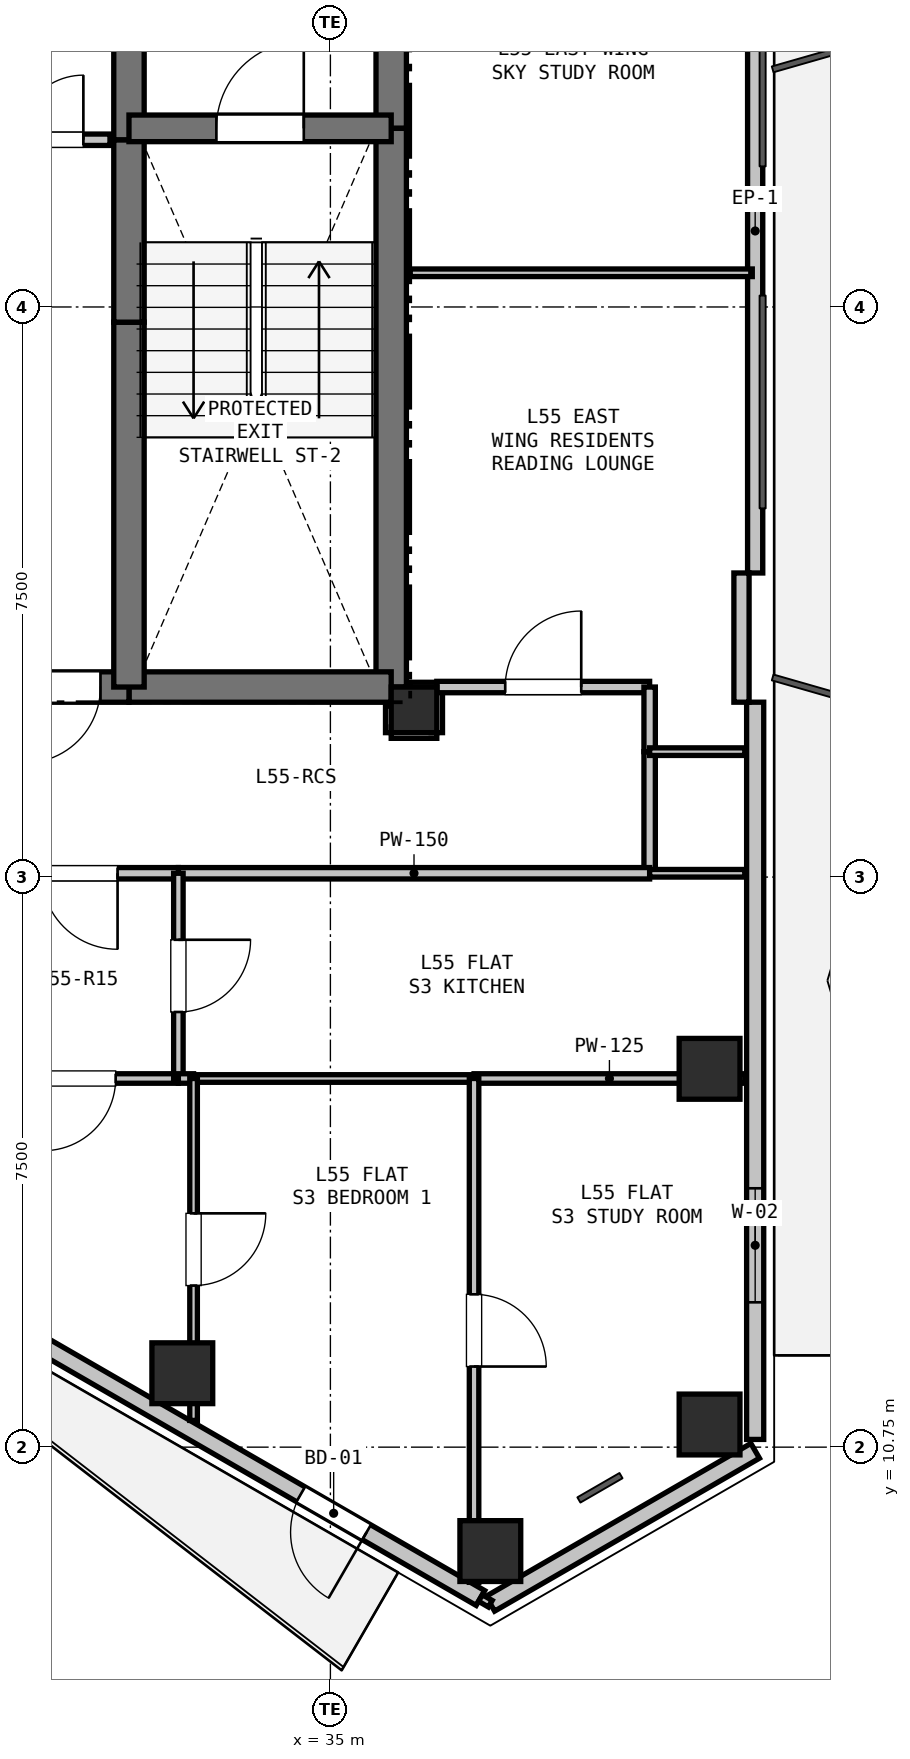
"""IFC4 building model, lengths in metres.
Left out: names, types, materials, properties, quantities, classifications, styles, units other than length and angle.
Written with IfcOpenShell. Run it as: python <this file> out.ifc"""

import sys

from ifc_helpers import new_model, si_unit, direction, frame, frame_2d, origin, origin_2d, place, context, subcontext, project, spatial, rectangle, hollow_rectangle, extrude, element, fill, save


model = new_model("IFC4")
c1 = context("Model", 3, precision=1e-05, world=origin(), true_north=direction((0.0, 1.0)))
c2 = subcontext(c1, "Body", "Model", "MODEL_VIEW")
j1 = project(units=[si_unit("LENGTHUNIT", "METRE"), si_unit("PLANEANGLEUNIT", "RADIAN")], contexts=[c1])
p1 = place(None, origin())
s1 = spatial("IfcSite", under=j1, at=p1, CompositionType="ELEMENT")
p2 = place(p1, origin())
s2 = spatial("IfcBuilding", under=s1, at=p2, CompositionType="ELEMENT")
p3 = place(p2, frame((0.0, 0.0, 198.6)))
s3 = spatial("IfcBuildingStorey", under=s2, at=p3, CompositionType="ELEMENT", Elevation=198.6)
p4 = place(p3, frame((36.1, 20.45, 0.0), z_axis=(0.0, 0.0, 1.0), x_axis=(1.0, 0.0, 0.0)))
e1 = element("IfcColumn", 1, at=p4, inside=s3, PredefinedType="COLUMN", context=c2, shape_type="SweptSolid", body=[
    extrude(rectangle(XDim=0.6, YDim=0.6, at=origin_2d()), origin(), (0.0, 0.0, 1.0), 3.3),
])
for number, where, z_axis, x_axis in (
    (2, (39.988, 15.727, 0.0), (0.0, 0.0, 1.0), (1.0, 0.0, 0.0)),
    (3, (39.988, 11.048, 0.0), (0.0, 0.0, 1.0), (1.0, 0.0, 0.0)),
    (4, (37.104, 9.383, 0.0), (0.0, 0.0, 1.0), (1.0, 0.0, 0.0)),
    (5, (33.052, 11.722, 0.0), (0.0, 0.0, 1.0), (1.0, 0.0, 0.0)),
):
    element("IfcColumn", number, at=place(p3, frame(where, z_axis=z_axis, x_axis=x_axis)), inside=s3, PredefinedType="COLUMN", context=c2, shape_type="SweptSolid", body=[
        extrude(hollow_rectangle(XDim=0.8, YDim=0.8, WallThickness=0.025, at=origin_2d()), origin(), (0.0, 0.0, 1.0), 3.3),
    ])
p5 = place(p3, frame((40.588, 10.702, 0.0), z_axis=(0.0, 0.0, 1.0), x_axis=(-0.866023907196, -0.500002592159, 0.0)))
e6 = element("IfcWall", 6, at=p5, inside=s3, PredefinedType="SOLIDWALL", context=c2, shape_type="SweptSolid", body=[
    extrude(rectangle(XDim=4.023, YDim=0.225, at=frame_2d((2.012, 0.0))), origin(), (0.0, 0.0, 1.0), 2.69),
])
p6 = place(p3, frame((40.588, 31.25, 0.0), z_axis=(0.0, 0.0, 1.0), x_axis=(0.0, -1.0, 0.0)))
e7 = element("IfcWall", 7, at=p6, inside=s3, PredefinedType="PARAPET", context=c2, shape_type="SweptSolid", body=[
    extrude(rectangle(XDim=8.999, YDim=0.2, at=frame_2d((4.5, 0.0))), origin(), (0.0, 0.0, 1.0), 0.2),
])
p7 = place(p3, frame((40.588, 20.551, 0.0), z_axis=(0.0, 0.0, 1.0), x_axis=(0.0, -1.0, 0.0)))
e8 = element("IfcWall", 8, at=p7, inside=s3, PredefinedType="SOLIDWALL", context=c2, shape_type="SweptSolid", body=[
    extrude(rectangle(XDim=9.699, YDim=0.225, at=frame_2d((4.85, 0.0))), origin(), (0.0, 0.0, 1.0), 2.69),
])
p8 = place(p7, frame((6.395, 0.0, 0.9)))
e9 = element("IfcOpeningElement", 9, at=p8, cuts=e8, PredefinedType="OPENING", context=c2, shape_type="SweptSolid", body=[
    extrude(rectangle(XDim=1.5, YDim=1.5, at=frame_2d((0.75, 0.75))), frame((0.0, 0.123, 0.0), z_axis=(0.0, -1.0, 0.0), x_axis=(1.0, 0.0, 0.0)), (0.0, 0.0, 1.0), 0.245),
])
p9 = place(p3, frame((40.408, 22.25, 0.0), z_axis=(0.0, 0.0, 1.0), x_axis=(0.0, -1.0, 0.0)))
e10 = element("IfcWall", 10, at=p9, inside=s3, PredefinedType="PARAPET", context=c2, shape_type="SweptSolid", body=[
    extrude(rectangle(XDim=1.7, YDim=0.2, at=frame_2d((0.85, 0.0))), origin(), (0.0, 0.0, 1.0), 2.69),
])
p10 = place(p3, frame((36.974, 8.765, 0.0), z_axis=(0.0, 0.0, 1.0), x_axis=(-0.866016233231, 0.500015883528, 0.0)))
e11 = element("IfcWall", 11, at=p10, inside=s3, PredefinedType="SOLIDWALL", context=c2, shape_type="SweptSolid", body=[
    extrude(rectangle(XDim=9.699, YDim=0.225, at=frame_2d((4.85, 0.0))), origin(), (0.0, 0.0, 1.0), 2.69),
])
p11 = place(p10, frame((1.73, 0.0, 0.0)))
e12 = element("IfcOpeningElement", 12, at=p11, cuts=e11, PredefinedType="OPENING", context=c2, shape_type="SweptSolid", body=[
    extrude(rectangle(XDim=1.0, YDim=2.1, at=frame_2d((0.5, 1.05))), frame((0.0, 0.123, 0.0), z_axis=(0.0, -1.0, 0.0), x_axis=(1.0, 0.0, 0.0)), (0.0, 0.0, 1.0), 0.245),
])
p12 = place(p3, frame((35.8, 32.75, 0.0), z_axis=(0.0, 0.0, 1.0), x_axis=(0.0, -1.0, 0.0)))
e13 = element("IfcWall", 13, at=p12, inside=s3, PredefinedType="SHEAR", context=c2, shape_type="SweptSolid", body=[
    extrude(rectangle(XDim=4.65, YDim=0.4, at=frame_2d((2.325, 0.0))), origin(), (0.0, 0.0, 1.0), 3.07),
])
p13 = place(p3, frame((35.8, 28.1, 0.0), z_axis=(0.0, 0.0, 1.0), x_axis=(0.0, -1.0, 0.0)))
e14 = element("IfcWall", 14, at=p13, inside=s3, PredefinedType="SHEAR", context=c2, shape_type="SweptSolid", body=[
    extrude(rectangle(XDim=7.35, YDim=0.4, at=frame_2d((3.675, 0.0))), origin(), (0.0, 0.0, 1.0), 3.07),
])
p14 = place(p3, frame((35.8, 20.75, 0.0), z_axis=(0.0, 0.0, 1.0), x_axis=(-1.0, 0.0, 0.0)))
e15 = element("IfcWall", 15, at=p14, inside=s3, PredefinedType="SHEAR", context=c2, shape_type="SweptSolid", body=[
    extrude(rectangle(XDim=3.45, YDim=0.4, at=frame_2d((1.725, 0.0))), origin(), (0.0, 0.0, 1.0), 3.07),
])
p15 = place(p3, frame((32.35, 20.75, 0.0), z_axis=(0.0, 0.0, 1.0), x_axis=(-1.0, 0.0, 0.0)))
e16 = element("IfcWall", 16, at=p15, inside=s3, PredefinedType="SHEAR", context=c2, shape_type="SweptSolid", body=[
    extrude(rectangle(XDim=1.75, YDim=0.4, at=frame_2d((0.875, 0.0))), origin(), (0.0, 0.0, 1.0), 3.07),
])
p16 = place(p15, frame((0.375, 0.0, 0.0)))
e17 = element("IfcOpeningElement", 17, at=p16, cuts=e16, PredefinedType="OPENING", context=c2, shape_type="SweptSolid", body=[
    extrude(rectangle(XDim=1.0, YDim=2.15, at=frame_2d((0.5, 1.075))), frame((0.0, 0.21, 0.0), z_axis=(0.0, -1.0, 0.0), x_axis=(1.0, 0.0, 0.0)), (0.0, 0.0, 1.0), 0.42),
])
p17 = place(p3, frame((32.35, 20.75, 0.0), z_axis=(0.0, 0.0, 1.0), x_axis=(0.0, 1.0, 0.0)))
e18 = element("IfcWall", 18, at=p17, inside=s3, PredefinedType="SHEAR", context=c2, shape_type="SweptSolid", body=[
    extrude(rectangle(XDim=4.8, YDim=0.4, at=frame_2d((2.4, 0.0))), origin(), (0.0, 0.0, 1.0), 3.07),
])
p18 = place(p3, frame((32.35, 25.55, 0.0), z_axis=(0.0, 0.0, 1.0), x_axis=(0.0, 1.0, 0.0)))
e19 = element("IfcWall", 19, at=p18, inside=s3, PredefinedType="SHEAR", context=c2, shape_type="SweptSolid", body=[
    extrude(rectangle(XDim=2.4, YDim=0.4, at=frame_2d((1.2, 0.0))), origin(), (0.0, 0.0, 1.0), 3.07),
])
p19 = place(p3, frame((32.35, 27.95, 0.0), z_axis=(0.0, 0.0, 1.0), x_axis=(0.0, 1.0, 0.0)))
e20 = element("IfcWall", 20, at=p19, inside=s3, PredefinedType="SHEAR", context=c2, shape_type="SweptSolid", body=[
    extrude(rectangle(XDim=2.8, YDim=0.4, at=frame_2d((1.4, 0.0))), origin(), (0.0, 0.0, 1.0), 3.07),
])
p20 = place(p3, frame((32.35, 28.1, 0.0), z_axis=(0.0, 0.0, 1.0), x_axis=(1.0, 0.0, 0.0)))
e21 = element("IfcWall", 21, at=p20, inside=s3, PredefinedType="SHEAR", context=c2, shape_type="SweptSolid", body=[
    extrude(rectangle(XDim=3.45, YDim=0.35, at=frame_2d((1.725, 0.0))), origin(), (0.0, 0.0, 1.0), 3.07),
])
p21 = place(p20, frame((1.15, 0.0, 0.0)))
e22 = element("IfcOpeningElement", 22, at=p21, cuts=e21, PredefinedType="OPENING", context=c2, shape_type="SweptSolid", body=[
    extrude(rectangle(XDim=1.15, YDim=2.15, at=frame_2d((0.575, 1.075))), frame((0.0, 0.185, 0.0), z_axis=(0.0, -1.0, 0.0), x_axis=(1.0, 0.0, 0.0)), (0.0, 0.0, 1.0), 0.37),
])
p22 = place(p3, frame((30.55, 27.95, 0.0), z_axis=(0.0, 0.0, 1.0), x_axis=(1.0, 0.0, 0.0)))
e23 = element("IfcWall", 23, at=p22, inside=s3, PredefinedType="PARTITIONING", context=c2, shape_type="SweptSolid", body=[
    extrude(rectangle(XDim=1.55, YDim=0.15, at=frame_2d((0.775, 0.0))), origin(), (0.0, 0.0, 1.0), 3.07),
])
p23 = place(p22, frame((0.35, 0.0, 0.0)))
e24 = element("IfcOpeningElement", 24, at=p23, cuts=e23, PredefinedType="OPENING", context=c2, shape_type="SweptSolid", body=[
    extrude(rectangle(XDim=0.85, YDim=2.1, at=frame_2d((0.425, 1.05))), frame((0.0, 0.085, 0.0), z_axis=(0.0, -1.0, 0.0), x_axis=(1.0, 0.0, 0.0)), (0.0, 0.0, 1.0), 0.17),
])
p24 = place(p3, frame((35.8, 20.5, 0.0), z_axis=(0.0, 0.0, 1.0), x_axis=(0.0, -1.0, 0.0)))
e25 = element("IfcWall", 25, at=p24, inside=s3, PredefinedType="PARTITIONING", context=c2, shape_type="SweptSolid", body=[
    extrude(rectangle(XDim=0.35, YDim=0.15, at=frame_2d((0.175, 0.0))), origin(), (0.0, 0.0, 1.0), 2.595),
])
p25 = place(p3, frame((35.8, 20.15, 0.0), z_axis=(0.0, 0.0, 1.0), x_axis=(1.0, 0.0, 0.0)))
e26 = element("IfcWall", 26, at=p25, inside=s3, PredefinedType="PARTITIONING", context=c2, shape_type="SweptSolid", body=[
    extrude(rectangle(XDim=0.6, YDim=0.15, at=frame_2d((0.3, 0.0))), origin(), (0.0, 0.0, 1.0), 2.518),
])
p26 = place(p3, frame((36.4, 20.15, 0.0), z_axis=(0.0, 0.0, 1.0), x_axis=(0.0, 1.0, 0.0)))
e27 = element("IfcWall", 27, at=p26, inside=s3, PredefinedType="PARTITIONING", context=c2, shape_type="SweptSolid", body=[
    extrude(rectangle(XDim=0.6, YDim=0.15, at=frame_2d((0.3, 0.0))), origin(), (0.0, 0.0, 1.0), 2.518),
])
p27 = place(p3, frame((36.4, 20.75, 0.0), z_axis=(0.0, 0.0, 1.0), x_axis=(1.0, 0.0, 0.0)))
e28 = element("IfcWall", 28, at=p27, inside=s3, PredefinedType="PARTITIONING", context=c2, shape_type="SweptSolid", body=[
    extrude(rectangle(XDim=2.8, YDim=0.15, at=frame_2d((1.4, 0.0))), origin(), (0.0, 0.0, 1.0), 3.07),
])
p28 = place(p27, frame((0.9, 0.0, 0.0)))
e29 = element("IfcOpeningElement", 29, at=p28, cuts=e28, PredefinedType="OPENING", context=c2, shape_type="SweptSolid", body=[
    extrude(rectangle(XDim=1.0, YDim=2.15, at=frame_2d((0.5, 1.075))), frame((0.0, 0.085, 0.0), z_axis=(0.0, -1.0, 0.0), x_axis=(1.0, 0.0, 0.0)), (0.0, 0.0, 1.0), 0.17),
])
p29 = place(p3, frame((39.2, 20.75, 0.0), z_axis=(0.0, 0.0, 1.0), x_axis=(0.0, -1.0, 0.0)))
e30 = element("IfcWall", 30, at=p29, inside=s3, PredefinedType="PARTITIONING", context=c2, shape_type="SweptSolid", body=[
    extrude(rectangle(XDim=0.85, YDim=0.15, at=frame_2d((0.425, 0.0))), origin(), (0.0, 0.0, 1.0), 3.07),
])
p30 = place(p3, frame((39.2, 19.9, 0.0), z_axis=(0.0, 0.0, 1.0), x_axis=(0.0, -1.0, 0.0)))
e31 = element("IfcWall", 31, at=p30, inside=s3, PredefinedType="PARTITIONING", context=c2, shape_type="SweptSolid", body=[
    extrude(rectangle(XDim=1.6, YDim=0.15, at=frame_2d((0.8, 0.0))), origin(), (0.0, 0.0, 1.0), 3.07),
])
p31 = place(p3, frame((39.2, 18.3, 0.0), z_axis=(0.0, 0.0, 1.0), x_axis=(-1.0, 0.0, 0.0)))
e32 = element("IfcWall", 32, at=p31, inside=s3, PredefinedType="PARTITIONING", context=c2, shape_type="SweptSolid", body=[
    extrude(rectangle(XDim=6.2, YDim=0.15, at=frame_2d((3.1, 0.0))), origin(), (0.0, 0.0, 1.0), 2.518),
])
p32 = place(p3, frame((33.0, 18.3, 0.0), z_axis=(0.0, 0.0, 1.0), x_axis=(-1.0, 0.0, 0.0)))
e33 = element("IfcWall", 33, at=p32, inside=s3, PredefinedType="PARTITIONING", context=c2, shape_type="SweptSolid", body=[
    extrude(rectangle(XDim=2.6, YDim=0.15, at=frame_2d((1.3, 0.0))), origin(), (0.0, 0.0, 1.0), 3.07),
])
p33 = place(p32, frame((0.8, 0.0, 0.0)))
e34 = element("IfcOpeningElement", 34, at=p33, cuts=e33, PredefinedType="OPENING", context=c2, shape_type="SweptSolid", body=[
    extrude(rectangle(XDim=1.0, YDim=2.15, at=frame_2d((0.5, 1.075))), frame((0.0, 0.085, 0.0), z_axis=(0.0, -1.0, 0.0), x_axis=(1.0, 0.0, 0.0)), (0.0, 0.0, 1.0), 0.17),
])
p34 = place(p3, frame((33.0, 15.6, 0.0), z_axis=(0.0, 0.0, 1.0), x_axis=(-1.0, 0.0, 0.0)))
e35 = element("IfcWall", 35, at=p34, inside=s3, PredefinedType="PARTITIONING", context=c2, shape_type="SweptSolid", body=[
    extrude(rectangle(XDim=2.6, YDim=0.125, at=frame_2d((1.3, 0.0))), origin(), (0.0, 0.0, 1.0), 3.07),
])
p35 = place(p34, frame((0.825, 0.0, 0.0)))
e36 = element("IfcOpeningElement", 36, at=p35, cuts=e35, PredefinedType="OPENING", context=c2, shape_type="SweptSolid", body=[
    extrude(rectangle(XDim=0.95, YDim=2.1, at=frame_2d((0.475, 1.05))), frame((0.0, 0.073, 0.0), z_axis=(0.0, -1.0, 0.0), x_axis=(1.0, 0.0, 0.0)), (0.0, 0.0, 1.0), 0.145),
])
p36 = place(p3, frame((33.0, 18.3, 0.0), z_axis=(0.0, 0.0, 1.0), x_axis=(0.0, -1.0, 0.0)))
e37 = element("IfcWall", 37, at=p36, inside=s3, PredefinedType="PARTITIONING", context=c2, shape_type="SweptSolid", body=[
    extrude(rectangle(XDim=2.7, YDim=0.125, at=frame_2d((1.35, 0.0))), origin(), (0.0, 0.0, 1.0), 3.07),
])
p37 = place(p36, frame((0.875, 0.0, 0.0)))
e38 = element("IfcOpeningElement", 38, at=p37, cuts=e37, PredefinedType="OPENING", context=c2, shape_type="SweptSolid", body=[
    extrude(rectangle(XDim=0.95, YDim=2.1, at=frame_2d((0.475, 1.05))), frame((0.0, 0.073, 0.0), z_axis=(0.0, -1.0, 0.0), x_axis=(1.0, 0.0, 0.0)), (0.0, 0.0, 1.0), 0.145),
])
p38 = place(p3, frame((39.2, 18.3, 0.0), z_axis=(0.0, 0.0, 1.0), x_axis=(1.0, 0.0, 0.0)))
e39 = element("IfcWall", 39, at=p38, inside=s3, PredefinedType="PARTITIONING", context=c2, shape_type="SweptSolid", body=[
    extrude(rectangle(XDim=1.252, YDim=0.1, at=frame_2d((0.626, 0.0))), origin(), (0.0, 0.0, 1.0), 2.365),
])
p39 = place(p3, frame((40.452, 15.6, 0.0), z_axis=(0.0, 0.0, 1.0), x_axis=(-1.0, 0.0, 0.0)))
e40 = element("IfcWall", 40, at=p39, inside=s3, PredefinedType="PARTITIONING", context=c2, shape_type="SweptSolid", body=[
    extrude(rectangle(XDim=3.562, YDim=0.125, at=frame_2d((1.781, 0.0))), origin(), (0.0, 0.0, 1.0), 2.518),
])
p40 = place(p3, frame((36.89, 15.6, 0.0), z_axis=(0.0, 0.0, 1.0), x_axis=(-1.0, 0.0, 0.0)))
e41 = element("IfcWall", 41, at=p40, inside=s3, PredefinedType="PARTITIONING", context=c2, shape_type="SweptSolid", body=[
    extrude(rectangle(XDim=3.69, YDim=0.1, at=frame_2d((1.845, 0.0))), origin(), (0.0, 0.0, 1.0), 3.07),
])
p41 = place(p3, frame((33.2, 15.6, 0.0), z_axis=(0.0, 0.0, 1.0), x_axis=(-1.0, 0.0, 0.0)))
e42 = element("IfcWall", 42, at=p41, inside=s3, PredefinedType="PARTITIONING", context=c2, shape_type="SweptSolid", body=[
    extrude(rectangle(XDim=0.2, YDim=0.125, at=frame_2d((0.1, 0.0))), origin(), (0.0, 0.0, 1.0), 3.07),
])
p42 = place(p3, frame((40.55, 26.2, 0.0), z_axis=(0.0, 0.0, 1.0), x_axis=(-1.0, 0.0, 0.0)))
e43 = element("IfcWall", 43, at=p42, inside=s3, PredefinedType="PARTITIONING", context=c2, shape_type="SweptSolid", body=[
    extrude(rectangle(XDim=4.5, YDim=0.1, at=frame_2d((2.25, 0.0))), origin(), (0.0, 0.0, 1.0), 2.365),
])
p43 = place(p3, frame((36.4, 20.75, 0.0), z_axis=(0.0, 0.0, 1.0), x_axis=(-1.0, 0.0, 0.0)))
e44 = element("IfcWall", 44, at=p43, inside=s3, PredefinedType="PARTITIONING", context=c2, shape_type="SweptSolid", body=[
    extrude(rectangle(XDim=0.35, YDim=0.125, at=frame_2d((0.175, 0.0))), origin(), (0.0, 0.0, 1.0), 2.595),
])
p44 = place(p3, frame((40.452, 19.9, 0.0), z_axis=(0.0, 0.0, 1.0), x_axis=(-1.0, 0.0, 0.0)))
e45 = element("IfcWall", 45, at=p44, inside=s3, PredefinedType="PARTITIONING", context=c2, shape_type="SweptSolid", body=[
    extrude(rectangle(XDim=1.252, YDim=0.1, at=frame_2d((0.626, 0.0))), origin(), (0.0, 0.0, 1.0), 2.365),
])
p45 = place(p3, frame((33.2, 15.6, 0.0), z_axis=(0.0, 0.0, 1.0), x_axis=(0.0, -1.0, 0.0)))
e46 = element("IfcWall", 46, at=p45, inside=s3, PredefinedType="PARTITIONING", context=c2, shape_type="SweptSolid", body=[
    extrude(rectangle(XDim=4.499, YDim=0.1, at=frame_2d((2.249, 0.0))), origin(), (0.0, 0.0, 1.0), 3.07),
])
p46 = place(p45, frame((1.774, 0.0, 0.0)))
e47 = element("IfcOpeningElement", 47, at=p46, cuts=e46, PredefinedType="OPENING", context=c2, shape_type="SweptSolid", body=[
    extrude(rectangle(XDim=0.95, YDim=2.1, at=frame_2d((0.475, 1.05))), frame((0.0, 0.06, 0.0), z_axis=(0.0, -1.0, 0.0), x_axis=(1.0, 0.0, 0.0)), (0.0, 0.0, 1.0), 0.12),
])
p47 = place(p3, frame((36.89, 15.6, 0.0), z_axis=(0.0, 0.0, 1.0), x_axis=(0.0, -1.0, 0.0)))
e48 = element("IfcWall", 48, at=p47, inside=s3, PredefinedType="PARTITIONING", context=c2, shape_type="SweptSolid", body=[
    extrude(rectangle(XDim=6.629, YDim=0.125, at=frame_2d((3.314, 0.0))), origin(), (0.0, 0.0, 1.0), 3.07),
])
p48 = place(p47, frame((2.839, 0.0, 0.0)))
e49 = element("IfcOpeningElement", 49, at=p48, cuts=e48, PredefinedType="OPENING", context=c2, shape_type="SweptSolid", body=[
    extrude(rectangle(XDim=0.95, YDim=2.1, at=frame_2d((0.475, 1.05))), frame((0.0, 0.073, 0.0), z_axis=(0.0, -1.0, 0.0), x_axis=(1.0, 0.0, 0.0)), (0.0, 0.0, 1.0), 0.145),
])
p49 = place(p3, frame((37.104, 8.69, 0.0), z_axis=(0.0, 0.0, 1.0), x_axis=(-0.865017048845, 0.50174246901, 0.0)))
e50 = element("IfcWall", 50, at=p49, inside=s3, PredefinedType="PARTITIONING", context=c2, shape_type="SweptSolid", body=[
    extrude(rectangle(XDim=0.15, YDim=0.1, at=frame_2d((0.075, 0.0))), origin(), (0.0, 0.0, 1.0), 3.07),
])
p50 = place(p8, origin())
e51 = element("IfcWindow", 51, at=p50, inside=s3, PartitioningType="SINGLE_PANEL", PredefinedType="WINDOW", context=c2, shape_type="SweptSolid", body=[
    extrude(rectangle(XDim=1.5, YDim=1.5, at=frame_2d((0.75, 0.75))), frame((0.0, 0.03, 0.0), z_axis=(0.0, -1.0, 0.0), x_axis=(1.0, 0.0, 0.0)), (0.0, 0.0, 1.0), 0.06),
])
fill(e9, e51)
p51 = place(p11, origin())
e52 = element("IfcDoor", 52, at=p51, inside=s3, OperationType="SINGLE_SWING_LEFT", PredefinedType="DOOR", context=c2, shape_type="SweptSolid", body=[
    extrude(rectangle(XDim=1.0, YDim=2.1, at=frame_2d((0.5, 1.05))), frame((0.0, 0.025, 0.0), z_axis=(0.0, -1.0, 0.0), x_axis=(1.0, 0.0, 0.0)), (0.0, 0.0, 1.0), 0.05),
])
fill(e12, e52)
p52 = place(p16, origin())
e53 = element("IfcDoor", 53, at=p52, inside=s3, OperationType="SINGLE_SWING_RIGHT", PredefinedType="DOOR", context=c2, shape_type="SweptSolid", body=[
    extrude(rectangle(XDim=1.0, YDim=2.15, at=frame_2d((0.5, 1.075))), frame((0.0, 0.025, 0.0), z_axis=(0.0, -1.0, 0.0), x_axis=(1.0, 0.0, 0.0)), (0.0, 0.0, 1.0), 0.05),
])
fill(e17, e53)
p53 = place(p21, origin())
e54 = element("IfcDoor", 54, at=p53, inside=s3, OperationType="SINGLE_SWING_RIGHT", PredefinedType="DOOR", context=c2, shape_type="SweptSolid", body=[
    extrude(rectangle(XDim=1.15, YDim=2.15, at=frame_2d((0.575, 1.075))), frame((0.0, 0.025, 0.0), z_axis=(0.0, -1.0, 0.0), x_axis=(1.0, 0.0, 0.0)), (0.0, 0.0, 1.0), 0.05),
])
fill(e22, e54)
p54 = place(p23, origin())
e55 = element("IfcDoor", 55, at=p54, inside=s3, OperationType="SINGLE_SWING_RIGHT", PredefinedType="DOOR", context=c2, shape_type="SweptSolid", body=[
    extrude(rectangle(XDim=0.85, YDim=2.1, at=frame_2d((0.425, 1.05))), frame((0.0, 0.025, 0.0), z_axis=(0.0, -1.0, 0.0), x_axis=(1.0, 0.0, 0.0)), (0.0, 0.0, 1.0), 0.05),
])
fill(e24, e55)
p55 = place(p33, origin())
e56 = element("IfcDoor", 56, at=p55, inside=s3, OperationType="SINGLE_SWING_LEFT", PredefinedType="DOOR", context=c2, shape_type="SweptSolid", body=[
    extrude(rectangle(XDim=1.0, YDim=2.15, at=frame_2d((0.5, 1.075))), frame((0.0, 0.025, 0.0), z_axis=(0.0, -1.0, 0.0), x_axis=(1.0, 0.0, 0.0)), (0.0, 0.0, 1.0), 0.05),
])
fill(e34, e56)
p56 = place(p28, origin())
e57 = element("IfcDoor", 57, at=p56, inside=s3, OperationType="SINGLE_SWING_RIGHT", PredefinedType="DOOR", context=c2, shape_type="SweptSolid", body=[
    extrude(rectangle(XDim=1.0, YDim=2.15, at=frame_2d((0.5, 1.075))), frame((0.0, 0.025, 0.0), z_axis=(0.0, -1.0, 0.0), x_axis=(1.0, 0.0, 0.0)), (0.0, 0.0, 1.0), 0.05),
])
fill(e29, e57)
p57 = place(p37, origin())
e58 = element("IfcDoor", 58, at=p57, inside=s3, OperationType="SINGLE_SWING_LEFT", PredefinedType="DOOR", context=c2, shape_type="SweptSolid", body=[
    extrude(rectangle(XDim=0.95, YDim=2.1, at=frame_2d((0.475, 1.05))), frame((0.0, 0.025, 0.0), z_axis=(0.0, -1.0, 0.0), x_axis=(1.0, 0.0, 0.0)), (0.0, 0.0, 1.0), 0.05),
])
fill(e38, e58)
p58 = place(p35, origin())
e59 = element("IfcDoor", 59, at=p58, inside=s3, OperationType="SINGLE_SWING_RIGHT", PredefinedType="DOOR", context=c2, shape_type="SweptSolid", body=[
    extrude(rectangle(XDim=0.95, YDim=2.1, at=frame_2d((0.475, 1.05))), frame((0.0, 0.025, 0.0), z_axis=(0.0, -1.0, 0.0), x_axis=(1.0, 0.0, 0.0)), (0.0, 0.0, 1.0), 0.05),
])
fill(e36, e59)
p59 = place(p46, origin())
e60 = element("IfcDoor", 60, at=p59, inside=s3, OperationType="SINGLE_SWING_LEFT", PredefinedType="DOOR", context=c2, shape_type="SweptSolid", body=[
    extrude(rectangle(XDim=0.95, YDim=2.1, at=frame_2d((0.475, 1.05))), frame((0.0, 0.025, 0.0), z_axis=(0.0, -1.0, 0.0), x_axis=(1.0, 0.0, 0.0)), (0.0, 0.0, 1.0), 0.05),
])
fill(e47, e60)
p60 = place(p48, origin())
e61 = element("IfcDoor", 61, at=p60, inside=s3, OperationType="SINGLE_SWING_RIGHT", PredefinedType="DOOR", context=c2, shape_type="SweptSolid", body=[
    extrude(rectangle(XDim=0.95, YDim=2.1, at=frame_2d((0.475, 1.05))), frame((0.0, 0.025, 0.0), z_axis=(0.0, -1.0, 0.0), x_axis=(1.0, 0.0, 0.0)), (0.0, 0.0, 1.0), 0.05),
])
fill(e49, e61)
save(model, sys.argv[1])
